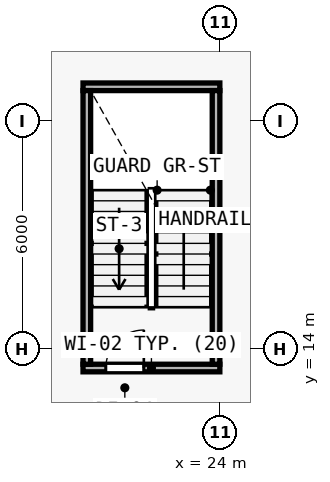
"""IFC4 building model, lengths in metres.
Left out: names, types, materials, properties, quantities, classifications, styles, units other than length and angle.
Written with IfcOpenShell. Run it as: python <this file> out.ifc"""

import sys

from ifc_helpers import new_model, si_unit, direction, frame, frame_2d, origin, place, context, subcontext, project, spatial, rectangle, extrude, element, fill, save


model = new_model("IFC4")
c1 = context("Model", 3, precision=1e-05, world=origin(), true_north=direction((0.0, 1.0)))
c2 = subcontext(c1, "Body", "Model", "MODEL_VIEW")
j1 = project(units=[si_unit("LENGTHUNIT", "METRE"), si_unit("PLANEANGLEUNIT", "RADIAN")], contexts=[c1])
p1 = place(None, origin())
s1 = spatial("IfcSite", under=j1, at=p1, CompositionType="ELEMENT")
p2 = place(p1, origin())
s2 = spatial("IfcBuilding", under=s1, at=p2, CompositionType="ELEMENT")
p3 = place(p2, frame((0.0, 0.0, 9.2)))
s3 = spatial("IfcBuildingStorey", under=s2, at=p3, CompositionType="ELEMENT", Elevation=9.2)
p4 = place(p3, frame((20.4, 13.5, 0.0), z_axis=(0.0, 0.0, 1.0), x_axis=(1.0, 0.0, 0.0)))
e1 = element("IfcWall", 1, at=p4, inside=s3, PredefinedType="SOLIDWALL", context=c2, shape_type="SweptSolid", body=[
    extrude(rectangle(XDim=3.6, YDim=0.2, at=frame_2d((1.8, 0.0))), origin(), (0.0, 0.0, 1.0), 3.92),
])
p5 = place(p4, frame((0.6, 0.0, 0.0)))
e2 = element("IfcOpeningElement", 2, at=p5, cuts=e1, PredefinedType="OPENING", context=c2, shape_type="SweptSolid", body=[
    extrude(rectangle(XDim=1.0, YDim=2.15, at=frame_2d((0.5, 1.075))), frame((0.0, 0.11, 0.0), z_axis=(0.0, -1.0, 0.0), x_axis=(1.0, 0.0, 0.0)), (0.0, 0.0, 1.0), 0.22),
])
p6 = place(p3, frame((20.4, 20.9, 0.0), z_axis=(0.0, 0.0, 1.0), x_axis=(1.0, 0.0, 0.0)))
e3 = element("IfcWall", 3, at=p6, inside=s3, PredefinedType="SOLIDWALL", context=c2, shape_type="SweptSolid", body=[
    extrude(rectangle(XDim=3.6, YDim=0.2, at=frame_2d((1.8, 0.0))), origin(), (0.0, 0.0, 1.0), 3.92),
])
for number, where, z_axis, x_axis in (
    (4, (20.5, 13.6, 0.0), (0.0, 0.0, 1.0), (0.0, 1.0, 0.0)),
    (5, (23.9, 13.6, 0.0), (0.0, 0.0, 1.0), (0.0, 1.0, 0.0)),
):
    element("IfcWall", number, at=place(p3, frame(where, z_axis=z_axis, x_axis=x_axis)), inside=s3, PredefinedType="SOLIDWALL", context=c2, shape_type="SweptSolid", body=[
        extrude(rectangle(XDim=7.2, YDim=0.2, at=frame_2d((3.6, 0.0))), origin(), (0.0, 0.0, 1.0), 3.92),
    ])
p7 = place(p5, origin())
e6 = element("IfcDoor", 6, at=p7, inside=s3, OperationType="SINGLE_SWING_RIGHT", PredefinedType="DOOR", context=c2, shape_type="SweptSolid", body=[
    extrude(rectangle(XDim=1.0, YDim=2.15, at=frame_2d((0.5, 1.075))), frame((0.0, 0.025, 0.0), z_axis=(0.0, -1.0, 0.0), x_axis=(1.0, 0.0, 0.0)), (0.0, 0.0, 1.0), 0.05),
])
fill(e2, e6)
save(model, sys.argv[1])
